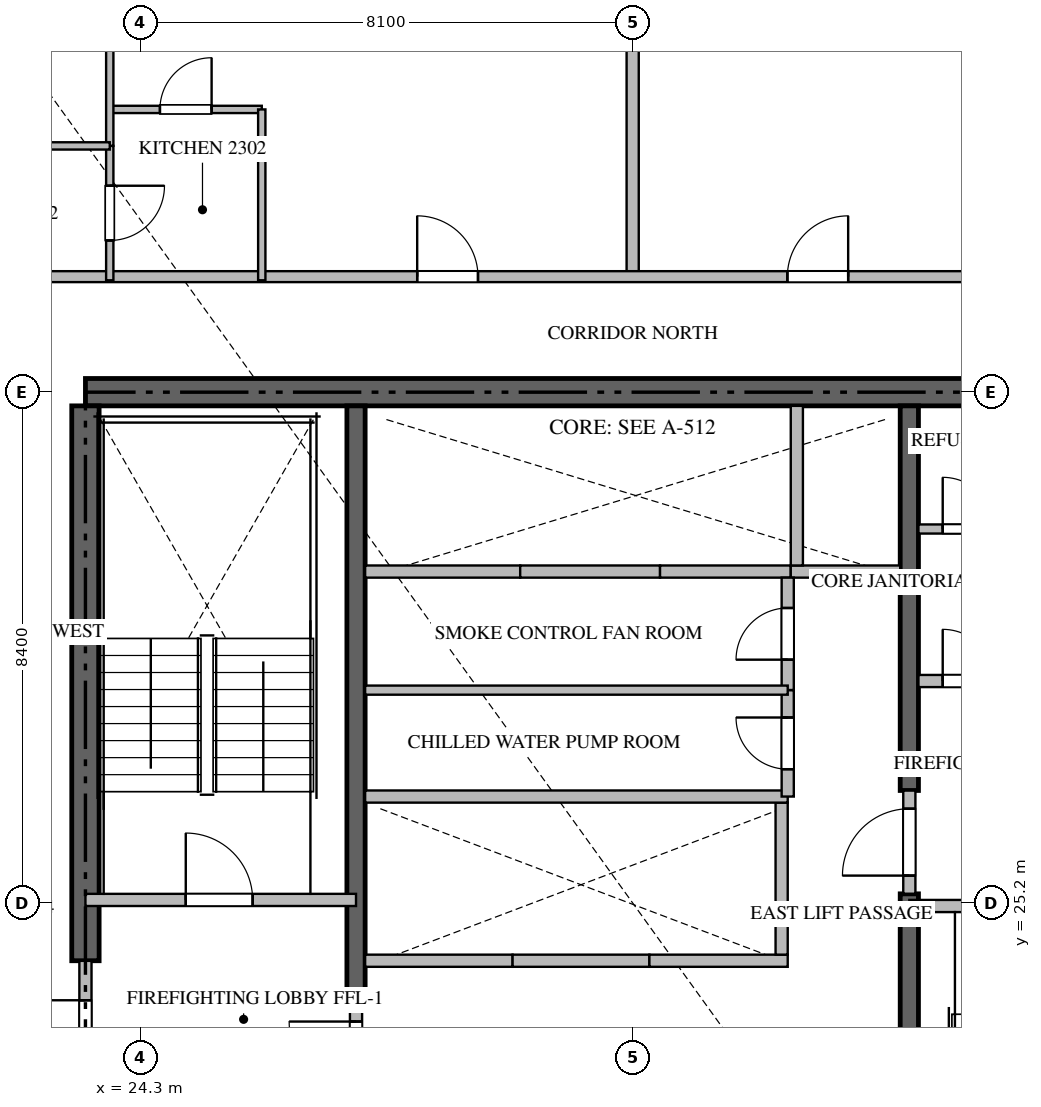
"""IFC4 building model, lengths in metres.
Left out: names, types, materials, properties, quantities, classifications, styles, units other than length and angle.
Written with IfcOpenShell. Run it as: python <this file> out.ifc"""

import sys

from ifc_helpers import new_model, si_unit, direction, frame, frame_2d, origin, place, context, subcontext, project, spatial, rectangle, extrude, source, transform, mapped, element, fill, save


model = new_model("IFC4")
c1 = context("Model", 3, precision=1e-05, world=origin(), true_north=direction((0.0, 1.0)))
c2 = subcontext(c1, "Body", "Model", "MODEL_VIEW")
j1 = project(units=[si_unit("LENGTHUNIT", "METRE"), si_unit("PLANEANGLEUNIT", "RADIAN")], contexts=[c1])
p1 = place(None, origin())
s1 = spatial("IfcSite", under=j1, at=p1, CompositionType="ELEMENT")
p2 = place(p1, origin())
s2 = spatial("IfcBuilding", under=s1, at=p2, CompositionType="ELEMENT")
p3 = place(p2, frame((0.0, 0.0, 94.2)))
s3 = spatial("IfcBuildingStorey", under=s2, at=p3, CompositionType="ELEMENT", Elevation=94.2)
p4 = place(p3, frame((41.4, 33.6, -0.26), z_axis=(0.0, 0.0, 1.0), x_axis=(-1.0, 0.0, 0.0)))
e1 = element("IfcWall", 1, at=p4, inside=s3, PredefinedType="SHEAR", context=c2, shape_type="SweptSolid", body=[
    extrude(rectangle(XDim=18.0, YDim=0.45, at=frame_2d((9.0, 0.0))), origin(), (0.0, 0.0, 1.0), 3.748),
])
p5 = place(p3, frame((23.4, 24.25, -0.26), z_axis=(0.0, 0.0, 1.0), x_axis=(0.0, 1.0, 0.0)))
e2 = element("IfcWall", 2, at=p5, inside=s3, PredefinedType="SHEAR", context=c2, shape_type="SweptSolid", body=[
    extrude(rectangle(XDim=9.125, YDim=0.45, at=frame_2d((4.562, 0.0))), origin(), (0.0, 0.0, 1.0), 3.748),
])
p6 = place(p3, frame((27.85, 23.55, -0.26), z_axis=(0.0, 0.0, 1.0), x_axis=(0.0, 1.0, 0.0)))
e3 = element("IfcWall", 3, at=p6, inside=s3, PredefinedType="SHEAR", context=c2, shape_type="SweptSolid", body=[
    extrude(rectangle(XDim=9.825, YDim=0.3, at=frame_2d((4.913, 0.0))), origin(), (0.0, 0.0, 1.0), 3.748),
])
p7 = place(p3, frame((36.95, 17.025, -0.26), z_axis=(0.0, 0.0, 1.0), x_axis=(0.0, 1.0, 0.0)))
e4 = element("IfcWall", 4, at=p7, inside=s3, PredefinedType="SHEAR", context=c2, shape_type="SweptSolid", body=[
    extrude(rectangle(XDim=8.325, YDim=0.3, at=frame_2d((4.163, 0.0))), origin(), (0.0, 0.0, 1.0), 3.748),
])
p8 = place(p3, frame((36.95, 27.05, -0.26), z_axis=(0.0, 0.0, 1.0), x_axis=(0.0, 1.0, 0.0)))
e5 = element("IfcWall", 5, at=p8, inside=s3, PredefinedType="SHEAR", context=c2, shape_type="SweptSolid", body=[
    extrude(rectangle(XDim=6.325, YDim=0.3, at=frame_2d((3.163, 0.0))), origin(), (0.0, 0.0, 1.0), 3.748),
])
p9 = place(p3, frame((23.4, 25.25, 0.0), z_axis=(0.0, 0.0, 1.0), x_axis=(1.0, 0.0, 0.0)))
e6 = element("IfcWall", 6, at=p9, inside=s3, PredefinedType="STANDARD", context=c2, shape_type="SweptSolid", body=[
    extrude(rectangle(XDim=4.45, YDim=0.2, at=frame_2d((2.225, 0.0))), origin(), (0.0, 0.0, 1.0), 3.49),
])
p10 = place(p9, frame((1.65, 0.0, 0.0)))
e7 = element("IfcOpeningElement", 7, at=p10, cuts=e6, PredefinedType="OPENING", context=c2, shape_type="SweptSolid", body=[
    extrude(rectangle(XDim=1.1, YDim=2.15, at=frame_2d((0.55, 1.075))), frame((0.0, 0.11, 0.0), z_axis=(0.0, -1.0, 0.0), x_axis=(1.0, 0.0, 0.0)), (0.0, 0.0, 1.0), 0.22),
])
p11 = place(p3, frame((36.95, 25.15, 0.0), z_axis=(0.0, 0.0, 1.0), x_axis=(1.0, 0.0, 0.0)))
e8 = element("IfcWall", 8, at=p11, inside=s3, PredefinedType="STANDARD", context=c2, shape_type="SweptSolid", body=[
    extrude(rectangle(XDim=4.45, YDim=0.2, at=frame_2d((2.225, 0.0))), origin(), (0.0, 0.0, 1.0), 3.49),
])
p12 = place(p11, frame((1.65, 0.0, 0.0)))
e9 = element("IfcOpeningElement", 9, at=p12, cuts=e8, PredefinedType="OPENING", context=c2, shape_type="SweptSolid", body=[
    extrude(rectangle(XDim=1.1, YDim=2.15, at=frame_2d((0.55, 1.075))), frame((0.0, 0.11, 0.0), z_axis=(0.0, -1.0, 0.0), x_axis=(1.0, 0.0, 0.0)), (0.0, 0.0, 1.0), 0.22),
])
p13 = place(p3, frame((28.0, 24.25, 0.0), z_axis=(0.0, 0.0, 1.0), x_axis=(1.0, 0.0, 0.0)))
e10 = element("IfcWall", 10, at=p13, inside=s3, PredefinedType="STANDARD", context=c2, shape_type="SweptSolid", body=[
    extrude(rectangle(XDim=2.425, YDim=0.2, at=frame_2d((1.212, 0.0))), origin(), (0.0, 0.0, 1.0), 3.49),
])
p14 = place(p3, frame((30.425, 24.25, 0.0), z_axis=(0.0, 0.0, 1.0), x_axis=(1.0, 0.0, 0.0)))
e11 = element("IfcWall", 11, at=p14, inside=s3, PredefinedType="STANDARD", context=c2, shape_type="SweptSolid", body=[
    extrude(rectangle(XDim=2.25, YDim=0.2, at=frame_2d((1.125, 0.0))), origin(), (0.0, 0.0, 1.0), 3.49),
])
p15 = place(p3, frame((32.675, 24.25, 0.0), z_axis=(0.0, 0.0, 1.0), x_axis=(1.0, 0.0, 0.0)))
e12 = element("IfcWall", 12, at=p15, inside=s3, PredefinedType="STANDARD", context=c2, shape_type="SweptSolid", body=[
    extrude(rectangle(XDim=2.275, YDim=0.2, at=frame_2d((1.137, 0.0))), origin(), (0.0, 0.0, 1.0), 3.49),
])
p16 = place(p3, frame((34.85, 24.35, 0.0), z_axis=(0.0, 0.0, 1.0), x_axis=(0.0, 1.0, 0.0)))
e13 = element("IfcWall", 13, at=p16, inside=s3, PredefinedType="STANDARD", context=c2, shape_type="SweptSolid", body=[
    extrude(rectangle(XDim=2.5, YDim=0.2, at=frame_2d((1.25, 0.0))), origin(), (0.0, 0.0, 1.0), 3.49),
])
p17 = place(p3, frame((28.0, 30.65, 0.0), z_axis=(0.0, 0.0, 1.0), x_axis=(1.0, 0.0, 0.0)))
e14 = element("IfcWall", 14, at=p17, inside=s3, PredefinedType="STANDARD", context=c2, shape_type="SweptSolid", body=[
    extrude(rectangle(XDim=2.55, YDim=0.2, at=frame_2d((1.275, 0.0))), origin(), (0.0, 0.0, 1.0), 3.49),
])
p18 = place(p3, frame((30.55, 30.65, 0.0), z_axis=(0.0, 0.0, 1.0), x_axis=(1.0, 0.0, 0.0)))
e15 = element("IfcWall", 15, at=p18, inside=s3, PredefinedType="STANDARD", context=c2, shape_type="SweptSolid", body=[
    extrude(rectangle(XDim=2.3, YDim=0.2, at=frame_2d((1.15, 0.0))), origin(), (0.0, 0.0, 1.0), 3.49),
])
p19 = place(p3, frame((32.85, 30.65, 0.0), z_axis=(0.0, 0.0, 1.0), x_axis=(1.0, 0.0, 0.0)))
e16 = element("IfcWall", 16, at=p19, inside=s3, PredefinedType="STANDARD", context=c2, shape_type="SweptSolid", body=[
    extrude(rectangle(XDim=2.15, YDim=0.2, at=frame_2d((1.075, 0.0))), origin(), (0.0, 0.0, 1.0), 3.49),
])
p20 = place(p3, frame((35.0, 30.65, 0.0), z_axis=(0.0, 0.0, 1.0), x_axis=(1.0, 0.0, 0.0)))
e17 = element("IfcWall", 17, at=p20, inside=s3, PredefinedType="STANDARD", context=c2, shape_type="SweptSolid", body=[
    extrude(rectangle(XDim=1.8, YDim=0.2, at=frame_2d((0.9, 0.0))), origin(), (0.0, 0.0, 1.0), 3.49),
])
p21 = place(p3, frame((35.1, 30.75, 0.0), z_axis=(0.0, 0.0, 1.0), x_axis=(0.0, 1.0, 0.0)))
e18 = element("IfcWall", 18, at=p21, inside=s3, PredefinedType="STANDARD", context=c2, shape_type="SweptSolid", body=[
    extrude(rectangle(XDim=2.625, YDim=0.2, at=frame_2d((1.312, 0.0))), origin(), (0.0, 0.0, 1.0), 3.49),
])
p22 = place(p3, frame((37.1, 28.85, 0.0), z_axis=(0.0, 0.0, 1.0), x_axis=(1.0, 0.0, 0.0)))
e19 = element("IfcWall", 19, at=p22, inside=s3, PredefinedType="STANDARD", context=c2, shape_type="SweptSolid", body=[
    extrude(rectangle(XDim=1.648, YDim=0.2, at=frame_2d((0.824, 0.0))), origin(), (0.0, 0.0, 1.0), 3.49),
])
p23 = place(p22, frame((0.399, 0.0, 0.0)))
e20 = element("IfcOpeningElement", 20, at=p23, cuts=e19, PredefinedType="OPENING", context=c2, shape_type="SweptSolid", body=[
    extrude(rectangle(XDim=0.85, YDim=2.1, at=frame_2d((0.425, 1.05))), frame((0.0, 0.11, 0.0), z_axis=(0.0, -1.0, 0.0), x_axis=(1.0, 0.0, 0.0)), (0.0, 0.0, 1.0), 0.22),
])
p24 = place(p3, frame((23.4, 21.852, 0.0), z_axis=(0.0, 0.0, 1.0), x_axis=(0.0, 1.0, 0.0)))
e21 = element("IfcWall", 21, at=p24, inside=s3, PredefinedType="STANDARD", context=c2, shape_type="SweptSolid", body=[
    extrude(rectangle(XDim=2.396, YDim=0.2, at=frame_2d((1.198, 0.0))), origin(), (0.0, 0.0, 1.0), 3.49),
])
p25 = place(p24, frame((0.648, 0.0, 0.0)))
e22 = element("IfcOpeningElement", 22, at=p25, cuts=e21, PredefinedType="OPENING", context=c2, shape_type="SweptSolid", body=[
    extrude(rectangle(XDim=1.1, YDim=2.15, at=frame_2d((0.55, 1.075))), frame((0.0, 0.11, 0.0), z_axis=(0.0, -1.0, 0.0), x_axis=(1.0, 0.0, 0.0)), (0.0, 0.0, 1.0), 0.22),
])
p26 = place(p3, frame((27.85, 21.852, 0.0), z_axis=(0.0, 0.0, 1.0), x_axis=(0.0, 1.0, 0.0)))
e23 = element("IfcWall", 23, at=p26, inside=s3, PredefinedType="STANDARD", context=c2, shape_type="SweptSolid", body=[
    extrude(rectangle(XDim=1.696, YDim=0.2, at=frame_2d((0.848, 0.0))), origin(), (0.0, 0.0, 1.0), 3.49),
])
p27 = place(p26, frame((0.298, 0.0, 0.0)))
e24 = element("IfcOpeningElement", 24, at=p27, cuts=e23, PredefinedType="OPENING", context=c2, shape_type="SweptSolid", body=[
    extrude(rectangle(XDim=1.1, YDim=2.15, at=frame_2d((0.55, 1.075))), frame((0.0, 0.11, 0.0), z_axis=(0.0, -1.0, 0.0), x_axis=(1.0, 0.0, 0.0)), (0.0, 0.0, 1.0), 0.22),
])
p28 = place(p3, frame((36.95, 25.352, 0.0), z_axis=(0.0, 0.0, 1.0), x_axis=(0.0, 1.0, 0.0)))
e25 = element("IfcWall", 25, at=p28, inside=s3, PredefinedType="STANDARD", context=c2, shape_type="SweptSolid", body=[
    extrude(rectangle(XDim=1.696, YDim=0.2, at=frame_2d((0.848, 0.0))), origin(), (0.0, 0.0, 1.0), 3.49),
])
p29 = place(p28, frame((0.298, 0.0, 0.0)))
e26 = element("IfcOpeningElement", 26, at=p29, cuts=e25, PredefinedType="OPENING", context=c2, shape_type="SweptSolid", body=[
    extrude(rectangle(XDim=1.1, YDim=2.15, at=frame_2d((0.55, 1.075))), frame((0.0, 0.11, 0.0), z_axis=(0.0, -1.0, 0.0), x_axis=(1.0, 0.0, 0.0)), (0.0, 0.0, 1.0), 0.22),
])
p30 = place(p3, frame((28.0, 26.95, 0.0), z_axis=(0.0, 0.0, 1.0), x_axis=(1.0, 0.0, 0.0)))
e27 = element("IfcWall", 27, at=p30, inside=s3, PredefinedType="STANDARD", context=c2, shape_type="SweptSolid", body=[
    extrude(rectangle(XDim=6.95, YDim=0.2, at=frame_2d((3.475, 0.0))), origin(), (0.0, 0.0, 1.0), 3.49),
])
p31 = place(p3, frame((37.1, 31.35, 0.0), z_axis=(0.0, 0.0, 1.0), x_axis=(1.0, 0.0, 0.0)))
e28 = element("IfcWall", 28, at=p31, inside=s3, PredefinedType="PARTITIONING", context=c2, shape_type="SweptSolid", body=[
    extrude(rectangle(XDim=1.648, YDim=0.15, at=frame_2d((0.824, 0.0))), origin(), (0.0, 0.0, 1.0), 3.49),
])
p32 = place(p31, frame((0.399, 0.0, 0.0)))
e29 = element("IfcOpeningElement", 29, at=p32, cuts=e28, PredefinedType="OPENING", context=c2, shape_type="SweptSolid", body=[
    extrude(rectangle(XDim=0.85, YDim=2.1, at=frame_2d((0.425, 1.05))), frame((0.0, 0.085, 0.0), z_axis=(0.0, -1.0, 0.0), x_axis=(1.0, 0.0, 0.0)), (0.0, 0.0, 1.0), 0.17),
])
p33 = place(p3, frame((34.95, 26.95, 0.0), z_axis=(0.0, 0.0, 1.0), x_axis=(0.0, 1.0, 0.0)))
e30 = element("IfcWall", 30, at=p33, inside=s3, PredefinedType="STANDARD", context=c2, shape_type="SweptSolid", body=[
    extrude(rectangle(XDim=1.75, YDim=0.2, at=frame_2d((0.875, 0.0))), origin(), (0.0, 0.0, 1.0), 3.49),
])
p34 = place(p33, frame((0.45, 0.0, 0.0)))
e31 = element("IfcOpeningElement", 31, at=p34, cuts=e30, PredefinedType="OPENING", context=c2, shape_type="SweptSolid", body=[
    extrude(rectangle(XDim=0.85, YDim=2.1, at=frame_2d((0.425, 1.05))), frame((0.0, 0.11, 0.0), z_axis=(0.0, -1.0, 0.0), x_axis=(1.0, 0.0, 0.0)), (0.0, 0.0, 1.0), 0.22),
])
p35 = place(p3, frame((34.95, 28.702, 0.0), z_axis=(0.0, 0.0, 1.0), x_axis=(0.0, 1.0, 0.0)))
e32 = element("IfcWall", 32, at=p35, inside=s3, PredefinedType="STANDARD", context=c2, shape_type="SweptSolid", body=[
    extrude(rectangle(XDim=1.848, YDim=0.2, at=frame_2d((0.924, 0.0))), origin(), (0.0, 0.0, 1.0), 3.49),
])
p36 = place(p35, frame((0.499, 0.0, 0.0)))
e33 = element("IfcOpeningElement", 33, at=p36, cuts=e32, PredefinedType="OPENING", context=c2, shape_type="SweptSolid", body=[
    extrude(rectangle(XDim=0.85, YDim=2.1, at=frame_2d((0.425, 1.05))), frame((0.0, 0.11, 0.0), z_axis=(0.0, -1.0, 0.0), x_axis=(1.0, 0.0, 0.0)), (0.0, 0.0, 1.0), 0.22),
])
p37 = place(p3, frame((28.0, 28.7, 0.0), z_axis=(0.0, 0.0, 1.0), x_axis=(1.0, 0.0, 0.0)))
e34 = element("IfcWall", 34, at=p37, inside=s3, PredefinedType="PARTITIONING", context=c2, shape_type="SweptSolid", body=[
    extrude(rectangle(XDim=6.95, YDim=0.15, at=frame_2d((3.475, 0.0))), origin(), (0.0, 0.0, 1.0), 3.49),
])
p38 = place(p3, frame((32.4, 35.5, 0.0), z_axis=(0.0, 0.0, 1.0), x_axis=(0.0, 1.0, 0.0)))
e35 = element("IfcWall", 35, at=p38, inside=s3, PredefinedType="PARTITIONING", context=c2, shape_type="SweptSolid", body=[
    extrude(rectangle(XDim=14.618, YDim=0.2, at=frame_2d((7.309, 0.0))), origin(), (0.0, 0.0, 1.0), 3.49),
])
p39 = place(p3, frame((21.402, 35.5, 0.0), z_axis=(0.0, 0.0, 1.0), x_axis=(1.0, 0.0, 0.0)))
e36 = element("IfcWall", 36, at=p39, inside=s3, PredefinedType="PARTITIONING", context=c2, shape_type="SweptSolid", body=[
    extrude(rectangle(XDim=21.996, YDim=0.18, at=frame_2d((10.998, 0.0))), origin(), (0.0, 0.0, 1.0), 3.49),
])
p40 = place(p39, frame((7.454, 0.0, 0.0)))
e37 = element("IfcOpeningElement", 37, at=p40, cuts=e36, PredefinedType="OPENING", context=c2, shape_type="SweptSolid", body=[
    extrude(rectangle(XDim=1.0, YDim=2.15, at=frame_2d((0.5, 1.075))), frame((0.0, 0.1, 0.0), z_axis=(0.0, -1.0, 0.0), x_axis=(1.0, 0.0, 0.0)), (0.0, 0.0, 1.0), 0.2),
])
p41 = place(p39, frame((13.542, 0.0, 0.0)))
e38 = element("IfcOpeningElement", 38, at=p41, cuts=e36, PredefinedType="OPENING", context=c2, shape_type="SweptSolid", body=[
    extrude(rectangle(XDim=1.0, YDim=2.15, at=frame_2d((0.5, 1.075))), frame((0.0, 0.1, 0.0), z_axis=(0.0, -1.0, 0.0), x_axis=(1.0, 0.0, 0.0)), (0.0, 0.0, 1.0), 0.2),
])
p42 = place(p3, frame((23.8, 38.25, 0.0), z_axis=(0.0, 0.0, 1.0), x_axis=(1.0, 0.0, 0.0)))
e39 = element("IfcWall", 39, at=p42, inside=s3, PredefinedType="PARTITIONING", context=c2, shape_type="SweptSolid", body=[
    extrude(rectangle(XDim=2.5, YDim=0.12, at=frame_2d((1.25, 0.0))), origin(), (0.0, 0.0, 1.0), 3.49),
])
p43 = place(p42, frame((0.825, 0.0, 0.0)))
e40 = element("IfcOpeningElement", 40, at=p43, cuts=e39, PredefinedType="OPENING", context=c2, shape_type="SweptSolid", body=[
    extrude(rectangle(XDim=0.85, YDim=2.1, at=frame_2d((0.425, 1.05))), frame((0.0, 0.07, 0.0), z_axis=(0.0, -1.0, 0.0), x_axis=(1.0, 0.0, 0.0)), (0.0, 0.0, 1.0), 0.14),
])
p44 = place(p3, frame((26.3, 38.25, 0.0), z_axis=(0.0, 0.0, 1.0), x_axis=(0.0, -1.0, 0.0)))
e41 = element("IfcWall", 41, at=p44, inside=s3, PredefinedType="PARTITIONING", context=c2, shape_type="SweptSolid", body=[
    extrude(rectangle(XDim=2.81, YDim=0.12, at=frame_2d((1.405, 0.0))), origin(), (0.0, 0.0, 1.0), 3.49),
])
p45 = place(p3, frame((23.8, 37.65, 0.0), z_axis=(0.0, 0.0, 1.0), x_axis=(0.0, -1.0, 0.0)))
e42 = element("IfcWall", 42, at=p45, inside=s3, PredefinedType="PARTITIONING", context=c2, shape_type="SweptSolid", body=[
    extrude(rectangle(XDim=2.21, YDim=0.12, at=frame_2d((1.105, 0.0))), origin(), (0.0, 0.0, 1.0), 3.49),
])
p46 = place(p45, frame((0.655, 0.0, 0.0)))
e43 = element("IfcOpeningElement", 43, at=p46, cuts=e42, PredefinedType="OPENING", context=c2, shape_type="SweptSolid", body=[
    extrude(rectangle(XDim=0.9, YDim=2.1, at=frame_2d((0.45, 1.05))), frame((0.0, 0.07, 0.0), z_axis=(0.0, -1.0, 0.0), x_axis=(1.0, 0.0, 0.0)), (0.0, 0.0, 1.0), 0.14),
])
p47 = place(p3, frame((23.8, 46.003, 0.0), z_axis=(0.0, 0.0, 1.0), x_axis=(0.0, -1.0, 0.0)))
e44 = element("IfcWall", 44, at=p47, inside=s3, PredefinedType="PARTITIONING", context=c2, shape_type="SweptSolid", body=[
    extrude(rectangle(XDim=8.351, YDim=0.12, at=frame_2d((4.175, 0.0))), origin(), (0.0, 0.0, 1.0), 3.49),
])
p48 = place(p3, frame((20.752, 37.65, 0.0), z_axis=(0.0, 0.0, 1.0), x_axis=(1.0, 0.0, 0.0)))
e45 = element("IfcWall", 45, at=p48, inside=s3, PredefinedType="PARTITIONING", context=c2, shape_type="SweptSolid", body=[
    extrude(rectangle(XDim=3.048, YDim=0.12, at=frame_2d((1.524, 0.0))), origin(), (0.0, 0.0, 1.0), 3.49),
])
p49 = place(p48, frame((1.099, 0.0, 0.0)))
e46 = element("IfcOpeningElement", 46, at=p49, cuts=e45, PredefinedType="OPENING", context=c2, shape_type="SweptSolid", body=[
    extrude(rectangle(XDim=0.85, YDim=2.1, at=frame_2d((0.425, 1.05))), frame((0.0, 0.07, 0.0), z_axis=(0.0, -1.0, 0.0), x_axis=(1.0, 0.0, 0.0)), (0.0, 0.0, 1.0), 0.14),
])
m1 = source(origin(), c2, "Body", "SweptSolid", [
    extrude(rectangle(XDim=1.1, YDim=2.15, at=frame_2d((0.55, 1.075))), frame((0.0, 0.025, 0.0), z_axis=(0.0, -1.0, 0.0), x_axis=(1.0, 0.0, 0.0)), (0.0, 0.0, 1.0), 0.05),
])
p50 = place(p10, origin())
e47 = element("IfcDoor", 47, at=p50, inside=s3, OperationType="SINGLE_SWING_LEFT", PredefinedType="DOOR", context=c2, shape_type="MappedRepresentation", body=[
    mapped(m1, transform((0.0, 0.0, 0.0), scale=1.0)),
])
fill(e7, e47)
m2 = source(origin(), c2, "Body", "SweptSolid", [
    extrude(rectangle(XDim=0.85, YDim=2.1, at=frame_2d((0.425, 1.05))), frame((0.0, 0.025, 0.0), z_axis=(0.0, -1.0, 0.0), x_axis=(1.0, 0.0, 0.0)), (0.0, 0.0, 1.0), 0.05),
])
p51 = place(p23, origin())
e48 = element("IfcDoor", 48, at=p51, inside=s3, OperationType="SINGLE_SWING_LEFT", PredefinedType="DOOR", context=c2, shape_type="MappedRepresentation", body=[
    mapped(m2, transform((0.0, 0.0, 0.0), scale=1.0)),
])
fill(e20, e48)
p52 = place(p25, origin())
e49 = element("IfcDoor", 49, at=p52, inside=s3, OperationType="SINGLE_SWING_RIGHT", PredefinedType="DOOR", context=c2, shape_type="MappedRepresentation", body=[
    mapped(m1, transform((0.0, 0.0, 0.0), scale=1.0)),
])
fill(e22, e49)
p53 = place(p27, origin())
e50 = element("IfcDoor", 50, at=p53, inside=s3, OperationType="SINGLE_SWING_RIGHT", PredefinedType="DOOR", context=c2, shape_type="MappedRepresentation", body=[
    mapped(m1, transform((0.0, 0.0, 0.0), scale=1.0)),
])
fill(e24, e50)
p54 = place(p29, origin())
e51 = element("IfcDoor", 51, at=p54, inside=s3, OperationType="SINGLE_SWING_LEFT", PredefinedType="DOOR", context=c2, shape_type="MappedRepresentation", body=[
    mapped(m1, transform((0.0, 0.0, 0.0), scale=1.0)),
])
fill(e26, e51)
p55 = place(p32, origin())
e52 = element("IfcDoor", 52, at=p55, inside=s3, OperationType="SINGLE_SWING_LEFT", PredefinedType="DOOR", context=c2, shape_type="MappedRepresentation", body=[
    mapped(m2, transform((0.0, 0.0, 0.0), scale=1.0)),
])
fill(e29, e52)
p56 = place(p34, origin())
e53 = element("IfcDoor", 53, at=p56, inside=s3, OperationType="SINGLE_SWING_RIGHT", PredefinedType="DOOR", context=c2, shape_type="MappedRepresentation", body=[
    mapped(m2, transform((0.0, 0.0, 0.0), scale=1.0)),
])
fill(e31, e53)
p57 = place(p36, origin())
e54 = element("IfcDoor", 54, at=p57, inside=s3, OperationType="SINGLE_SWING_LEFT", PredefinedType="DOOR", context=c2, shape_type="MappedRepresentation", body=[
    mapped(m2, transform((0.0, 0.0, 0.0), scale=1.0)),
])
fill(e33, e54)
m3 = source(origin(), c2, "Body", "SweptSolid", [
    extrude(rectangle(XDim=1.0, YDim=2.15, at=frame_2d((0.5, 1.075))), frame((0.0, 0.025, 0.0), z_axis=(0.0, -1.0, 0.0), x_axis=(1.0, 0.0, 0.0)), (0.0, 0.0, 1.0), 0.05),
])
p58 = place(p40, origin())
e55 = element("IfcDoor", 55, at=p58, inside=s3, OperationType="SINGLE_SWING_LEFT", PredefinedType="DOOR", context=c2, shape_type="MappedRepresentation", body=[
    mapped(m3, transform((0.0, 0.0, 0.0), scale=1.0)),
])
fill(e37, e55)
p59 = place(p41, origin())
e56 = element("IfcDoor", 56, at=p59, inside=s3, OperationType="SINGLE_SWING_RIGHT", PredefinedType="DOOR", context=c2, shape_type="MappedRepresentation", body=[
    mapped(m3, transform((0.0, 0.0, 0.0), scale=1.0)),
])
fill(e38, e56)
p60 = place(p43, origin())
e57 = element("IfcDoor", 57, at=p60, inside=s3, OperationType="SINGLE_SWING_RIGHT", PredefinedType="DOOR", context=c2, shape_type="MappedRepresentation", body=[
    mapped(m2, transform((0.0, 0.0, 0.0), scale=1.0)),
])
fill(e40, e57)
m4 = source(origin(), c2, "Body", "SweptSolid", [
    extrude(rectangle(XDim=0.9, YDim=2.1, at=frame_2d((0.45, 1.05))), frame((0.0, 0.025, 0.0), z_axis=(0.0, -1.0, 0.0), x_axis=(1.0, 0.0, 0.0)), (0.0, 0.0, 1.0), 0.05),
])
p61 = place(p46, origin())
e58 = element("IfcDoor", 58, at=p61, inside=s3, OperationType="SINGLE_SWING_LEFT", PredefinedType="DOOR", context=c2, shape_type="MappedRepresentation", body=[
    mapped(m4, transform((0.0, 0.0, 0.0), scale=1.0)),
])
fill(e43, e58)
save(model, sys.argv[1])
